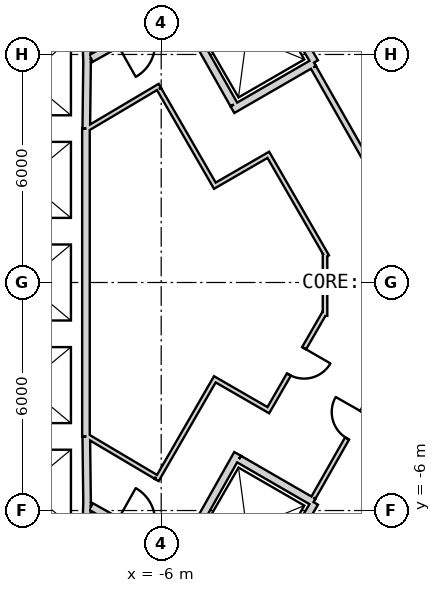
"""IFC4 building model, lengths in metres.
Left out: names, types, materials, properties, quantities, classifications, styles, units other than length and angle.
Written with IfcOpenShell. Run it as: python <this file> out.ifc"""

import sys

from ifc_helpers import new_model, si_unit, direction, frame, frame_2d, origin, place, context, subcontext, project, spatial, rectangle, extrude, element, fill, save


model = new_model("IFC4")
c1 = context("Model", 3, precision=1e-05, world=origin(), true_north=direction((0.0, 1.0)))
c2 = subcontext(c1, "Body", "Model", "MODEL_VIEW")
j1 = project(units=[si_unit("LENGTHUNIT", "METRE"), si_unit("PLANEANGLEUNIT", "RADIAN")], contexts=[c1])
p1 = place(None, origin())
s1 = spatial("IfcSite", under=j1, at=p1, CompositionType="ELEMENT")
p2 = place(p1, origin())
s2 = spatial("IfcBuilding", under=s1, at=p2, CompositionType="ELEMENT")
p3 = place(p2, frame((0.0, 0.0, 119.3)))
s3 = spatial("IfcBuildingStorey", under=s2, at=p3, CompositionType="ELEMENT", Elevation=119.3)
p4 = place(p3, frame((19.475, 2.208, 0.0), z_axis=(0.0, 0.0, 1.0), x_axis=(-0.866028369851, 0.499994862586, 0.0)))
e1 = element("IfcWall", 1, at=p4, inside=s3, PredefinedType="SHEAR", context=c2, shape_type="SweptSolid", body=[
    extrude(rectangle(XDim=31.523, YDim=0.9, at=frame_2d((15.762, 0.0))), origin(), (0.0, 0.0, 1.0), 4.1),
])
p5 = place(p4, frame((7.062, 0.0, 0.0)))
e2 = element("IfcOpeningElement", 2, at=p5, cuts=e1, PredefinedType="OPENING", context=c2, shape_type="SweptSolid", body=[
    extrude(rectangle(XDim=1.2, YDim=2.4, at=frame_2d((0.6, 1.2))), frame((0.0, 0.46, 0.0), z_axis=(0.0, -1.0, 0.0), x_axis=(1.0, 0.0, 0.0)), (0.0, 0.0, 1.0), 0.92),
])
p6 = place(p4, frame((9.762, 0.0, 0.0)))
e3 = element("IfcOpeningElement", 3, at=p6, cuts=e1, PredefinedType="OPENING", context=c2, shape_type="SweptSolid", body=[
    extrude(rectangle(XDim=1.2, YDim=2.4, at=frame_2d((0.6, 1.2))), frame((0.0, 0.46, 0.0), z_axis=(0.0, -1.0, 0.0), x_axis=(1.0, 0.0, 0.0)), (0.0, 0.0, 1.0), 0.92),
])
p7 = place(p4, frame((12.462, 0.0, 0.0)))
e4 = element("IfcOpeningElement", 4, at=p7, cuts=e1, PredefinedType="OPENING", context=c2, shape_type="SweptSolid", body=[
    extrude(rectangle(XDim=1.2, YDim=2.4, at=frame_2d((0.6, 1.2))), frame((0.0, 0.46, 0.0), z_axis=(0.0, -1.0, 0.0), x_axis=(1.0, 0.0, 0.0)), (0.0, 0.0, 1.0), 0.92),
])
p8 = place(p4, frame((15.162, 0.0, 0.0)))
e5 = element("IfcOpeningElement", 5, at=p8, cuts=e1, PredefinedType="OPENING", context=c2, shape_type="SweptSolid", body=[
    extrude(rectangle(XDim=1.2, YDim=2.4, at=frame_2d((0.6, 1.2))), frame((0.0, 0.46, 0.0), z_axis=(0.0, -1.0, 0.0), x_axis=(1.0, 0.0, 0.0)), (0.0, 0.0, 1.0), 0.92),
])
p9 = place(p4, frame((17.862, 0.0, 0.0)))
e6 = element("IfcOpeningElement", 6, at=p9, cuts=e1, PredefinedType="OPENING", context=c2, shape_type="SweptSolid", body=[
    extrude(rectangle(XDim=1.2, YDim=2.4, at=frame_2d((0.6, 1.2))), frame((0.0, 0.46, 0.0), z_axis=(0.0, -1.0, 0.0), x_axis=(1.0, 0.0, 0.0)), (0.0, 0.0, 1.0), 0.92),
])
p10 = place(p4, frame((20.562, 0.0, 0.0)))
e7 = element("IfcOpeningElement", 7, at=p10, cuts=e1, PredefinedType="OPENING", context=c2, shape_type="SweptSolid", body=[
    extrude(rectangle(XDim=1.2, YDim=2.4, at=frame_2d((0.6, 1.2))), frame((0.0, 0.46, 0.0), z_axis=(0.0, -1.0, 0.0), x_axis=(1.0, 0.0, 0.0)), (0.0, 0.0, 1.0), 0.92),
])
p11 = place(p4, frame((23.262, 0.0, 0.0)))
e8 = element("IfcOpeningElement", 8, at=p11, cuts=e1, PredefinedType="OPENING", context=c2, shape_type="SweptSolid", body=[
    extrude(rectangle(XDim=1.2, YDim=2.4, at=frame_2d((0.6, 1.2))), frame((0.0, 0.46, 0.0), z_axis=(0.0, -1.0, 0.0), x_axis=(1.0, 0.0, 0.0)), (0.0, 0.0, 1.0), 0.92),
])
p12 = place(p4, frame((3.612, 0.0, 0.0)))
e9 = element("IfcOpeningElement", 9, at=p12, cuts=e1, PredefinedType="OPENING", context=c2, shape_type="SweptSolid", body=[
    extrude(rectangle(XDim=1.2, YDim=2.4, at=frame_2d((0.6, 1.2))), frame((0.0, 0.46, 0.0), z_axis=(0.0, -1.0, 0.0), x_axis=(1.0, 0.0, 0.0)), (0.0, 0.0, 1.0), 0.92),
])
p13 = place(p4, frame((26.712, 0.0, 0.0)))
e10 = element("IfcOpeningElement", 10, at=p13, cuts=e1, PredefinedType="OPENING", context=c2, shape_type="SweptSolid", body=[
    extrude(rectangle(XDim=1.2, YDim=2.4, at=frame_2d((0.6, 1.2))), frame((0.0, 0.46, 0.0), z_axis=(0.0, -1.0, 0.0), x_axis=(1.0, 0.0, 0.0)), (0.0, 0.0, 1.0), 0.92),
])
p14 = place(p3, frame((-7.825, -17.97, 0.0), z_axis=(0.0, 0.0, 1.0), x_axis=(0.866028369851, 0.499994862586, 0.0)))
e11 = element("IfcWall", 11, at=p14, inside=s3, PredefinedType="SHEAR", context=c2, shape_type="SweptSolid", body=[
    extrude(rectangle(XDim=31.523, YDim=0.9, at=frame_2d((15.762, 0.0))), origin(), (0.0, 0.0, 1.0), 4.1),
])
p15 = place(p14, frame((7.062, 0.0, 0.0)))
e12 = element("IfcOpeningElement", 12, at=p15, cuts=e11, PredefinedType="OPENING", context=c2, shape_type="SweptSolid", body=[
    extrude(rectangle(XDim=1.2, YDim=2.4, at=frame_2d((0.6, 1.2))), frame((0.0, 0.46, 0.0), z_axis=(0.0, -1.0, 0.0), x_axis=(1.0, 0.0, 0.0)), (0.0, 0.0, 1.0), 0.92),
])
p16 = place(p14, frame((9.762, 0.0, 0.0)))
e13 = element("IfcOpeningElement", 13, at=p16, cuts=e11, PredefinedType="OPENING", context=c2, shape_type="SweptSolid", body=[
    extrude(rectangle(XDim=1.2, YDim=2.4, at=frame_2d((0.6, 1.2))), frame((0.0, 0.46, 0.0), z_axis=(0.0, -1.0, 0.0), x_axis=(1.0, 0.0, 0.0)), (0.0, 0.0, 1.0), 0.92),
])
p17 = place(p14, frame((12.462, 0.0, 0.0)))
e14 = element("IfcOpeningElement", 14, at=p17, cuts=e11, PredefinedType="OPENING", context=c2, shape_type="SweptSolid", body=[
    extrude(rectangle(XDim=1.2, YDim=2.4, at=frame_2d((0.6, 1.2))), frame((0.0, 0.46, 0.0), z_axis=(0.0, -1.0, 0.0), x_axis=(1.0, 0.0, 0.0)), (0.0, 0.0, 1.0), 0.92),
])
p18 = place(p14, frame((15.162, 0.0, 0.0)))
e15 = element("IfcOpeningElement", 15, at=p18, cuts=e11, PredefinedType="OPENING", context=c2, shape_type="SweptSolid", body=[
    extrude(rectangle(XDim=1.2, YDim=2.4, at=frame_2d((0.6, 1.2))), frame((0.0, 0.46, 0.0), z_axis=(0.0, -1.0, 0.0), x_axis=(1.0, 0.0, 0.0)), (0.0, 0.0, 1.0), 0.92),
])
p19 = place(p14, frame((17.862, 0.0, 0.0)))
e16 = element("IfcOpeningElement", 16, at=p19, cuts=e11, PredefinedType="OPENING", context=c2, shape_type="SweptSolid", body=[
    extrude(rectangle(XDim=1.2, YDim=2.4, at=frame_2d((0.6, 1.2))), frame((0.0, 0.46, 0.0), z_axis=(0.0, -1.0, 0.0), x_axis=(1.0, 0.0, 0.0)), (0.0, 0.0, 1.0), 0.92),
])
p20 = place(p14, frame((20.562, 0.0, 0.0)))
e17 = element("IfcOpeningElement", 17, at=p20, cuts=e11, PredefinedType="OPENING", context=c2, shape_type="SweptSolid", body=[
    extrude(rectangle(XDim=1.2, YDim=2.4, at=frame_2d((0.6, 1.2))), frame((0.0, 0.46, 0.0), z_axis=(0.0, -1.0, 0.0), x_axis=(1.0, 0.0, 0.0)), (0.0, 0.0, 1.0), 0.92),
])
p21 = place(p14, frame((26.712, 0.0, 0.0)))
e18 = element("IfcOpeningElement", 18, at=p21, cuts=e11, PredefinedType="OPENING", context=c2, shape_type="SweptSolid", body=[
    extrude(rectangle(XDim=1.2, YDim=2.4, at=frame_2d((0.6, 1.2))), frame((0.0, 0.46, 0.0), z_axis=(0.0, -1.0, 0.0), x_axis=(1.0, 0.0, 0.0)), (0.0, 0.0, 1.0), 0.92),
])
p22 = place(p14, frame((3.612, 0.0, 0.0)))
e19 = element("IfcOpeningElement", 19, at=p22, cuts=e11, PredefinedType="OPENING", context=c2, shape_type="SweptSolid", body=[
    extrude(rectangle(XDim=1.2, YDim=2.4, at=frame_2d((0.6, 1.2))), frame((0.0, 0.46, 0.0), z_axis=(0.0, -1.0, 0.0), x_axis=(1.0, 0.0, 0.0)), (0.0, 0.0, 1.0), 0.92),
])
p23 = place(p3, frame((-7.977, 6.65, 0.0), z_axis=(0.0, 0.0, 1.0), x_axis=(0.030861509705, -0.999523670164, 0.0)))
e20 = element("IfcWall", 20, at=p23, inside=s3, PredefinedType="PLUMBINGWALL", context=c2, shape_type="SweptSolid", body=[
    extrude(rectangle(XDim=0.878, YDim=0.2, at=frame_2d((0.439, 0.0))), origin(), (0.0, 0.0, 1.0), 3.8),
])
p24 = place(p3, frame((-7.949, 5.895, 0.0), z_axis=(0.0, 0.0, 1.0), x_axis=(-0.012042535896, -0.999927486035, 0.0)))
e21 = element("IfcWall", 21, at=p24, inside=s3, PredefinedType="PLUMBINGWALL", context=c2, shape_type="SweptSolid", body=[
    extrude(rectangle(XDim=1.845, YDim=0.2, at=frame_2d((0.922, 0.0))), origin(), (0.0, 0.0, 1.0), 3.8),
])
p25 = place(p3, frame((-7.98, 4.05, 0.0), z_axis=(0.0, 0.0, 1.0), x_axis=(0.0, -1.0, 0.0)))
e22 = element("IfcWall", 22, at=p25, inside=s3, PredefinedType="PLUMBINGWALL", context=c2, shape_type="SweptSolid", body=[
    extrude(rectangle(XDim=8.1, YDim=0.2, at=frame_2d((4.05, 0.0))), origin(), (0.0, 0.0, 1.0), 3.8),
])
p26 = place(p3, frame((-7.95, -5.772, 0.0), z_axis=(0.0, 0.0, 1.0), x_axis=(-0.030803413295, -0.999525462272, 0.0)))
e23 = element("IfcWall", 23, at=p26, inside=s3, PredefinedType="PLUMBINGWALL", context=c2, shape_type="SweptSolid", body=[
    extrude(rectangle(XDim=1.078, YDim=0.2, at=frame_2d((0.539, 0.0))), origin(), (0.0, 0.0, 1.0), 3.8),
])
p27 = place(p3, frame((-7.971, -4.05, 0.0), z_axis=(0.0, 0.0, 1.0), x_axis=(0.012042535896, -0.999927486035, 0.0)))
e24 = element("IfcWall", 24, at=p27, inside=s3, PredefinedType="PLUMBINGWALL", context=c2, shape_type="SweptSolid", body=[
    extrude(rectangle(XDim=1.845, YDim=0.2, at=frame_2d((0.922, 0.0))), origin(), (0.0, 0.0, 1.0), 3.8),
])
p28 = place(p3, frame((-3.538, 8.465, 0.0), z_axis=(0.0, 0.0, 1.0), x_axis=(0.508647062354, -0.860975125052, 0.0)))
e25 = element("IfcWall", 25, at=p28, inside=s3, PredefinedType="PLUMBINGWALL", context=c2, shape_type="SweptSolid", body=[
    extrude(rectangle(XDim=3.1, YDim=0.2, at=frame_2d((1.55, 0.0))), origin(), (0.0, 0.0, 1.0), 3.8),
])
p29 = place(p3, frame((-1.979, 5.786, 0.0), z_axis=(0.0, 0.0, 1.0), x_axis=(-0.866016689309, -0.500015093611, 0.0)))
e26 = element("IfcWall", 26, at=p29, inside=s3, PredefinedType="PLUMBINGWALL", context=c2, shape_type="SweptSolid", body=[
    extrude(rectangle(XDim=2.479, YDim=0.2, at=frame_2d((1.24, 0.0))), origin(), (0.0, 0.0, 1.0), 3.8),
])
p30 = place(p3, frame((-5.562, 7.296, 0.0), z_axis=(0.0, 0.0, 1.0), x_axis=(0.49134651263, -0.870964180966, 0.0)))
e27 = element("IfcWall", 27, at=p30, inside=s3, PredefinedType="PLUMBINGWALL", context=c2, shape_type="SweptSolid", body=[
    extrude(rectangle(XDim=3.0, YDim=0.2, at=frame_2d((1.5, 0.0))), origin(), (0.0, 0.0, 1.0), 3.8),
])
p31 = place(p3, frame((-1.961, -5.796, 0.0), z_axis=(0.0, 0.0, 1.0), x_axis=(-0.508647062354, -0.860975125052, 0.0)))
e28 = element("IfcWall", 28, at=p31, inside=s3, PredefinedType="PLUMBINGWALL", context=c2, shape_type="SweptSolid", body=[
    extrude(rectangle(XDim=3.1, YDim=0.2, at=frame_2d((1.55, 0.0))), origin(), (0.0, 0.0, 1.0), 3.8),
])
p32 = place(p3, frame((-3.99, -4.509, 0.0), z_axis=(0.0, 0.0, 1.0), x_axis=(-0.491358283181, -0.870957540612, 0.0)))
e29 = element("IfcWall", 29, at=p32, inside=s3, PredefinedType="PLUMBINGWALL", context=c2, shape_type="SweptSolid", body=[
    extrude(rectangle(XDim=3.2, YDim=0.2, at=frame_2d((1.6, 0.0))), origin(), (0.0, 0.0, 1.0), 3.8),
])
p33 = place(p3, frame((-3.953, -4.646, 0.0), z_axis=(0.0, 0.0, 1.0), x_axis=(0.866065302921, -0.4999308863, 0.0)))
e30 = element("IfcWall", 30, at=p33, inside=s3, PredefinedType="PLUMBINGWALL", context=c2, shape_type="SweptSolid", body=[
    extrude(rectangle(XDim=2.264, YDim=0.2, at=frame_2d((1.132, 0.0))), origin(), (0.0, 0.0, 1.0), 3.8),
])
p34 = place(p3, frame((-5.6, 7.16, 0.0), z_axis=(0.0, 0.0, 1.0), x_axis=(-0.871363259478, -0.490638431059, 0.0)))
e31 = element("IfcWall", 31, at=p34, inside=s3, PredefinedType="PARTITIONING", context=c2, shape_type="SweptSolid", body=[
    extrude(rectangle(XDim=2.581, YDim=0.2, at=frame_2d((1.291, 0.0))), origin(), (0.0, 0.0, 1.0), 3.8),
])
p35 = place(p34, frame((0.791, 0.0, 0.0)))
e32 = element("IfcOpeningElement", 32, at=p35, cuts=e31, PredefinedType="OPENING", context=c2, shape_type="SweptSolid", body=[
    extrude(rectangle(XDim=1.0, YDim=2.1, at=frame_2d((0.5, 1.05))), frame((0.0, 0.11, 0.0), z_axis=(0.0, -1.0, 0.0), x_axis=(1.0, 0.0, 0.0)), (0.0, 0.0, 1.0), 0.22),
])
p36 = place(p3, frame((-7.849, -5.894, 0.0), z_axis=(0.0, 0.0, 1.0), x_axis=(0.871363259478, -0.490638431059, 0.0)))
e33 = element("IfcWall", 33, at=p36, inside=s3, PredefinedType="PARTITIONING", context=c2, shape_type="SweptSolid", body=[
    extrude(rectangle(XDim=2.581, YDim=0.2, at=frame_2d((1.291, 0.0))), origin(), (0.0, 0.0, 1.0), 3.8),
])
p37 = place(p36, frame((0.791, 0.0, 0.0)))
e34 = element("IfcOpeningElement", 34, at=p37, cuts=e33, PredefinedType="OPENING", context=c2, shape_type="SweptSolid", body=[
    extrude(rectangle(XDim=1.0, YDim=2.1, at=frame_2d((0.5, 1.05))), frame((0.0, 0.11, 0.0), z_axis=(0.0, -1.0, 0.0), x_axis=(1.0, 0.0, 0.0)), (0.0, 0.0, 1.0), 0.22),
])
p38 = place(p3, frame((-1.994, 5.661, 0.0), z_axis=(0.0, 0.0, 1.0), x_axis=(0.494341211302, -0.869267948798, 0.0)))
e35 = element("IfcWall", 35, at=p38, inside=s3, PredefinedType="PLUMBINGWALL", context=c2, shape_type="SweptSolid", body=[
    extrude(rectangle(XDim=4.361, YDim=0.15, at=frame_2d((2.18, 0.0))), origin(), (0.0, 0.0, 1.0), 3.8),
])
p39 = place(p3, frame((0.224, -1.761, 0.0), z_axis=(0.0, 0.0, 1.0), x_axis=(-0.494327216836, -0.869275907118, 0.0)))
e36 = element("IfcWall", 36, at=p39, inside=s3, PredefinedType="PARTITIONING", context=c2, shape_type="SweptSolid", body=[
    extrude(rectangle(XDim=4.487, YDim=0.12, at=frame_2d((2.244, 0.0))), origin(), (0.0, 0.0, 1.0), 3.8),
])
p40 = place(p39, frame((1.895, 0.0, 0.0)))
e37 = element("IfcOpeningElement", 37, at=p40, cuts=e36, PredefinedType="OPENING", context=c2, shape_type="SweptSolid", body=[
    extrude(rectangle(XDim=0.8, YDim=2.1, at=frame_2d((0.4, 1.05))), frame((0.0, 0.07, 0.0), z_axis=(0.0, -1.0, 0.0), x_axis=(1.0, 0.0, 0.0)), (0.0, 0.0, 1.0), 0.14),
])
p41 = place(p3, frame((-6.037, 5.176, 0.0), z_axis=(0.0, 0.0, 1.0), x_axis=(-0.860106072674, -0.510115225953, 0.0)))
e38 = element("IfcWall", 38, at=p41, inside=s3, PredefinedType="PARTITIONING", context=c2, shape_type="SweptSolid", body=[
    extrude(rectangle(XDim=2.225, YDim=0.12, at=frame_2d((1.112, 0.0))), origin(), (0.0, 0.0, 1.0), 3.8),
])
p42 = place(p3, frame((-4.558, 2.495, 0.0), z_axis=(0.0, 0.0, 1.0), x_axis=(-0.499990139034, 0.866031096941, 0.0)))
e39 = element("IfcWall", 39, at=p42, inside=s3, PredefinedType="PARTITIONING", context=c2, shape_type="SweptSolid", body=[
    extrude(rectangle(XDim=3.0, YDim=0.12, at=frame_2d((1.5, 0.0))), origin(), (0.0, 0.0, 1.0), 3.8),
])
p43 = place(p3, frame((-3.129, 3.39, 0.0), z_axis=(0.0, 0.0, 1.0), x_axis=(-0.866053003207, -0.499952193351, 0.0)))
e40 = element("IfcWall", 40, at=p43, inside=s3, PredefinedType="PARTITIONING", context=c2, shape_type="SweptSolid", body=[
    extrude(rectangle(XDim=1.625, YDim=0.12, at=frame_2d((0.812, 0.0))), origin(), (0.0, 0.0, 1.0), 3.8),
])
p44 = place(p3, frame((-1.637, 0.685, 0.0), z_axis=(0.0, 0.0, 1.0), x_axis=(-0.500006252586, 0.866021793822, 0.0)))
e41 = element("IfcWall", 41, at=p44, inside=s3, PredefinedType="PARTITIONING", context=c2, shape_type="SweptSolid", body=[
    extrude(rectangle(XDim=3.028, YDim=0.12, at=frame_2d((1.514, 0.0))), origin(), (0.0, 0.0, 1.0), 3.8),
])
p45 = place(p3, frame((-1.689, -0.879, 0.0), z_axis=(0.0, 0.0, 1.0), x_axis=(0.0, 1.0, 0.0)))
e42 = element("IfcWall", 42, at=p45, inside=s3, PredefinedType="PARTITIONING", context=c2, shape_type="SweptSolid", body=[
    extrude(rectangle(XDim=1.635, YDim=0.12, at=frame_2d((0.818, 0.0))), origin(), (0.0, 0.0, 1.0), 3.8),
])
p46 = place(p3, frame((-3.211, -3.412, 0.0), z_axis=(0.0, 0.0, 1.0), x_axis=(0.499983190554, 0.866035108505, 0.0)))
e43 = element("IfcWall", 43, at=p46, inside=s3, PredefinedType="PARTITIONING", context=c2, shape_type="SweptSolid", body=[
    extrude(rectangle(XDim=3.026, YDim=0.12, at=frame_2d((1.513, 0.0))), origin(), (0.0, 0.0, 1.0), 3.8),
])
p47 = place(p46, frame((1.143, 0.0, 0.0)))
e44 = element("IfcOpeningElement", 44, at=p47, cuts=e43, PredefinedType="OPENING", context=c2, shape_type="SweptSolid", body=[
    extrude(rectangle(XDim=0.8, YDim=2.1, at=frame_2d((0.4, 1.05))), frame((0.0, 0.07, 0.0), z_axis=(0.0, -1.0, 0.0), x_axis=(1.0, 0.0, 0.0)), (0.0, 0.0, 1.0), 0.14),
])
p48 = place(p3, frame((-4.64, -2.517, 0.0), z_axis=(0.0, 0.0, 1.0), x_axis=(0.866015446554, -0.500017246033, 0.0)))
e45 = element("IfcWall", 45, at=p48, inside=s3, PredefinedType="PARTITIONING", context=c2, shape_type="SweptSolid", body=[
    extrude(rectangle(XDim=1.625, YDim=0.12, at=frame_2d((0.812, 0.0))), origin(), (0.0, 0.0, 1.0), 3.8),
])
p49 = place(p3, frame((-6.118, -5.197, 0.0), z_axis=(0.0, 0.0, 1.0), x_axis=(0.499990139034, 0.866031096941, 0.0)))
e46 = element("IfcWall", 46, at=p49, inside=s3, PredefinedType="PARTITIONING", context=c2, shape_type="SweptSolid", body=[
    extrude(rectangle(XDim=3.0, YDim=0.12, at=frame_2d((1.5, 0.0))), origin(), (0.0, 0.0, 1.0), 3.8),
])
p50 = place(p3, frame((-7.95, -4.041, 0.0), z_axis=(0.0, 0.0, 1.0), x_axis=(0.860112457103, -0.510104461004, 0.0)))
e47 = element("IfcWall", 47, at=p50, inside=s3, PredefinedType="PARTITIONING", context=c2, shape_type="SweptSolid", body=[
    extrude(rectangle(XDim=2.104, YDim=0.12, at=frame_2d((1.052, 0.0))), origin(), (0.0, 0.0, 1.0), 3.8),
])
p51 = place(p3, frame((-6.852, -20.93, 0.0), z_axis=(0.0, 0.0, 1.0), x_axis=(0.866023703603, 0.500002944789, 0.0)))
e48 = element("IfcWall", 48, at=p51, inside=s3, PredefinedType="PARTITIONING", context=c2, shape_type="SweptSolid", body=[
    extrude(rectangle(XDim=32.599, YDim=0.2, at=frame_2d((16.299, 0.0))), origin(), (0.0, 0.0, 1.0), 2.98),
])
p52 = place(p51, frame((27.463, 0.0, 0.0)))
e49 = element("IfcOpeningElement", 49, at=p52, cuts=e48, PredefinedType="OPENING", context=c2, shape_type="SweptSolid", body=[
    extrude(rectangle(XDim=1.0, YDim=2.1, at=frame_2d((0.5, 1.05))), frame((0.0, 0.11, 0.0), z_axis=(0.0, -1.0, 0.0), x_axis=(1.0, 0.0, 0.0)), (0.0, 0.0, 1.0), 0.22),
])
p53 = place(p51, frame((16.307, 0.0, 0.0)))
e50 = element("IfcOpeningElement", 50, at=p53, cuts=e48, PredefinedType="OPENING", context=c2, shape_type="SweptSolid", body=[
    extrude(rectangle(XDim=1.0, YDim=2.1, at=frame_2d((0.5, 1.05))), frame((0.0, 0.11, 0.0), z_axis=(0.0, -1.0, 0.0), x_axis=(1.0, 0.0, 0.0)), (0.0, 0.0, 1.0), 0.22),
])
p54 = place(p51, frame((4.694, 0.0, 0.0)))
e51 = element("IfcOpeningElement", 51, at=p54, cuts=e48, PredefinedType="OPENING", context=c2, shape_type="SweptSolid", body=[
    extrude(rectangle(XDim=1.0, YDim=2.1, at=frame_2d((0.5, 1.05))), frame((0.0, 0.11, 0.0), z_axis=(0.0, -1.0, 0.0), x_axis=(1.0, 0.0, 0.0)), (0.0, 0.0, 1.0), 0.22),
])
p55 = place(p40, origin())
e52 = element("IfcDoor", 52, at=p55, inside=s3, OperationType="SINGLE_SWING_LEFT", PredefinedType="USERDEFINED", context=c2, shape_type="SweptSolid", body=[
    extrude(rectangle(XDim=0.8, YDim=2.1, at=frame_2d((0.4, 1.05))), frame((0.0, 0.025, 0.0), z_axis=(0.0, -1.0, 0.0), x_axis=(1.0, 0.0, 0.0)), (0.0, 0.0, 1.0), 0.05),
])
fill(e37, e52)
p56 = place(p47, origin())
e53 = element("IfcDoor", 53, at=p56, inside=s3, OperationType="SINGLE_SWING_LEFT", PredefinedType="USERDEFINED", context=c2, shape_type="SweptSolid", body=[
    extrude(rectangle(XDim=0.8, YDim=2.1, at=frame_2d((0.4, 1.05))), frame((0.0, 0.025, 0.0), z_axis=(0.0, -1.0, 0.0), x_axis=(1.0, 0.0, 0.0)), (0.0, 0.0, 1.0), 0.05),
])
fill(e44, e53)
save(model, sys.argv[1])
